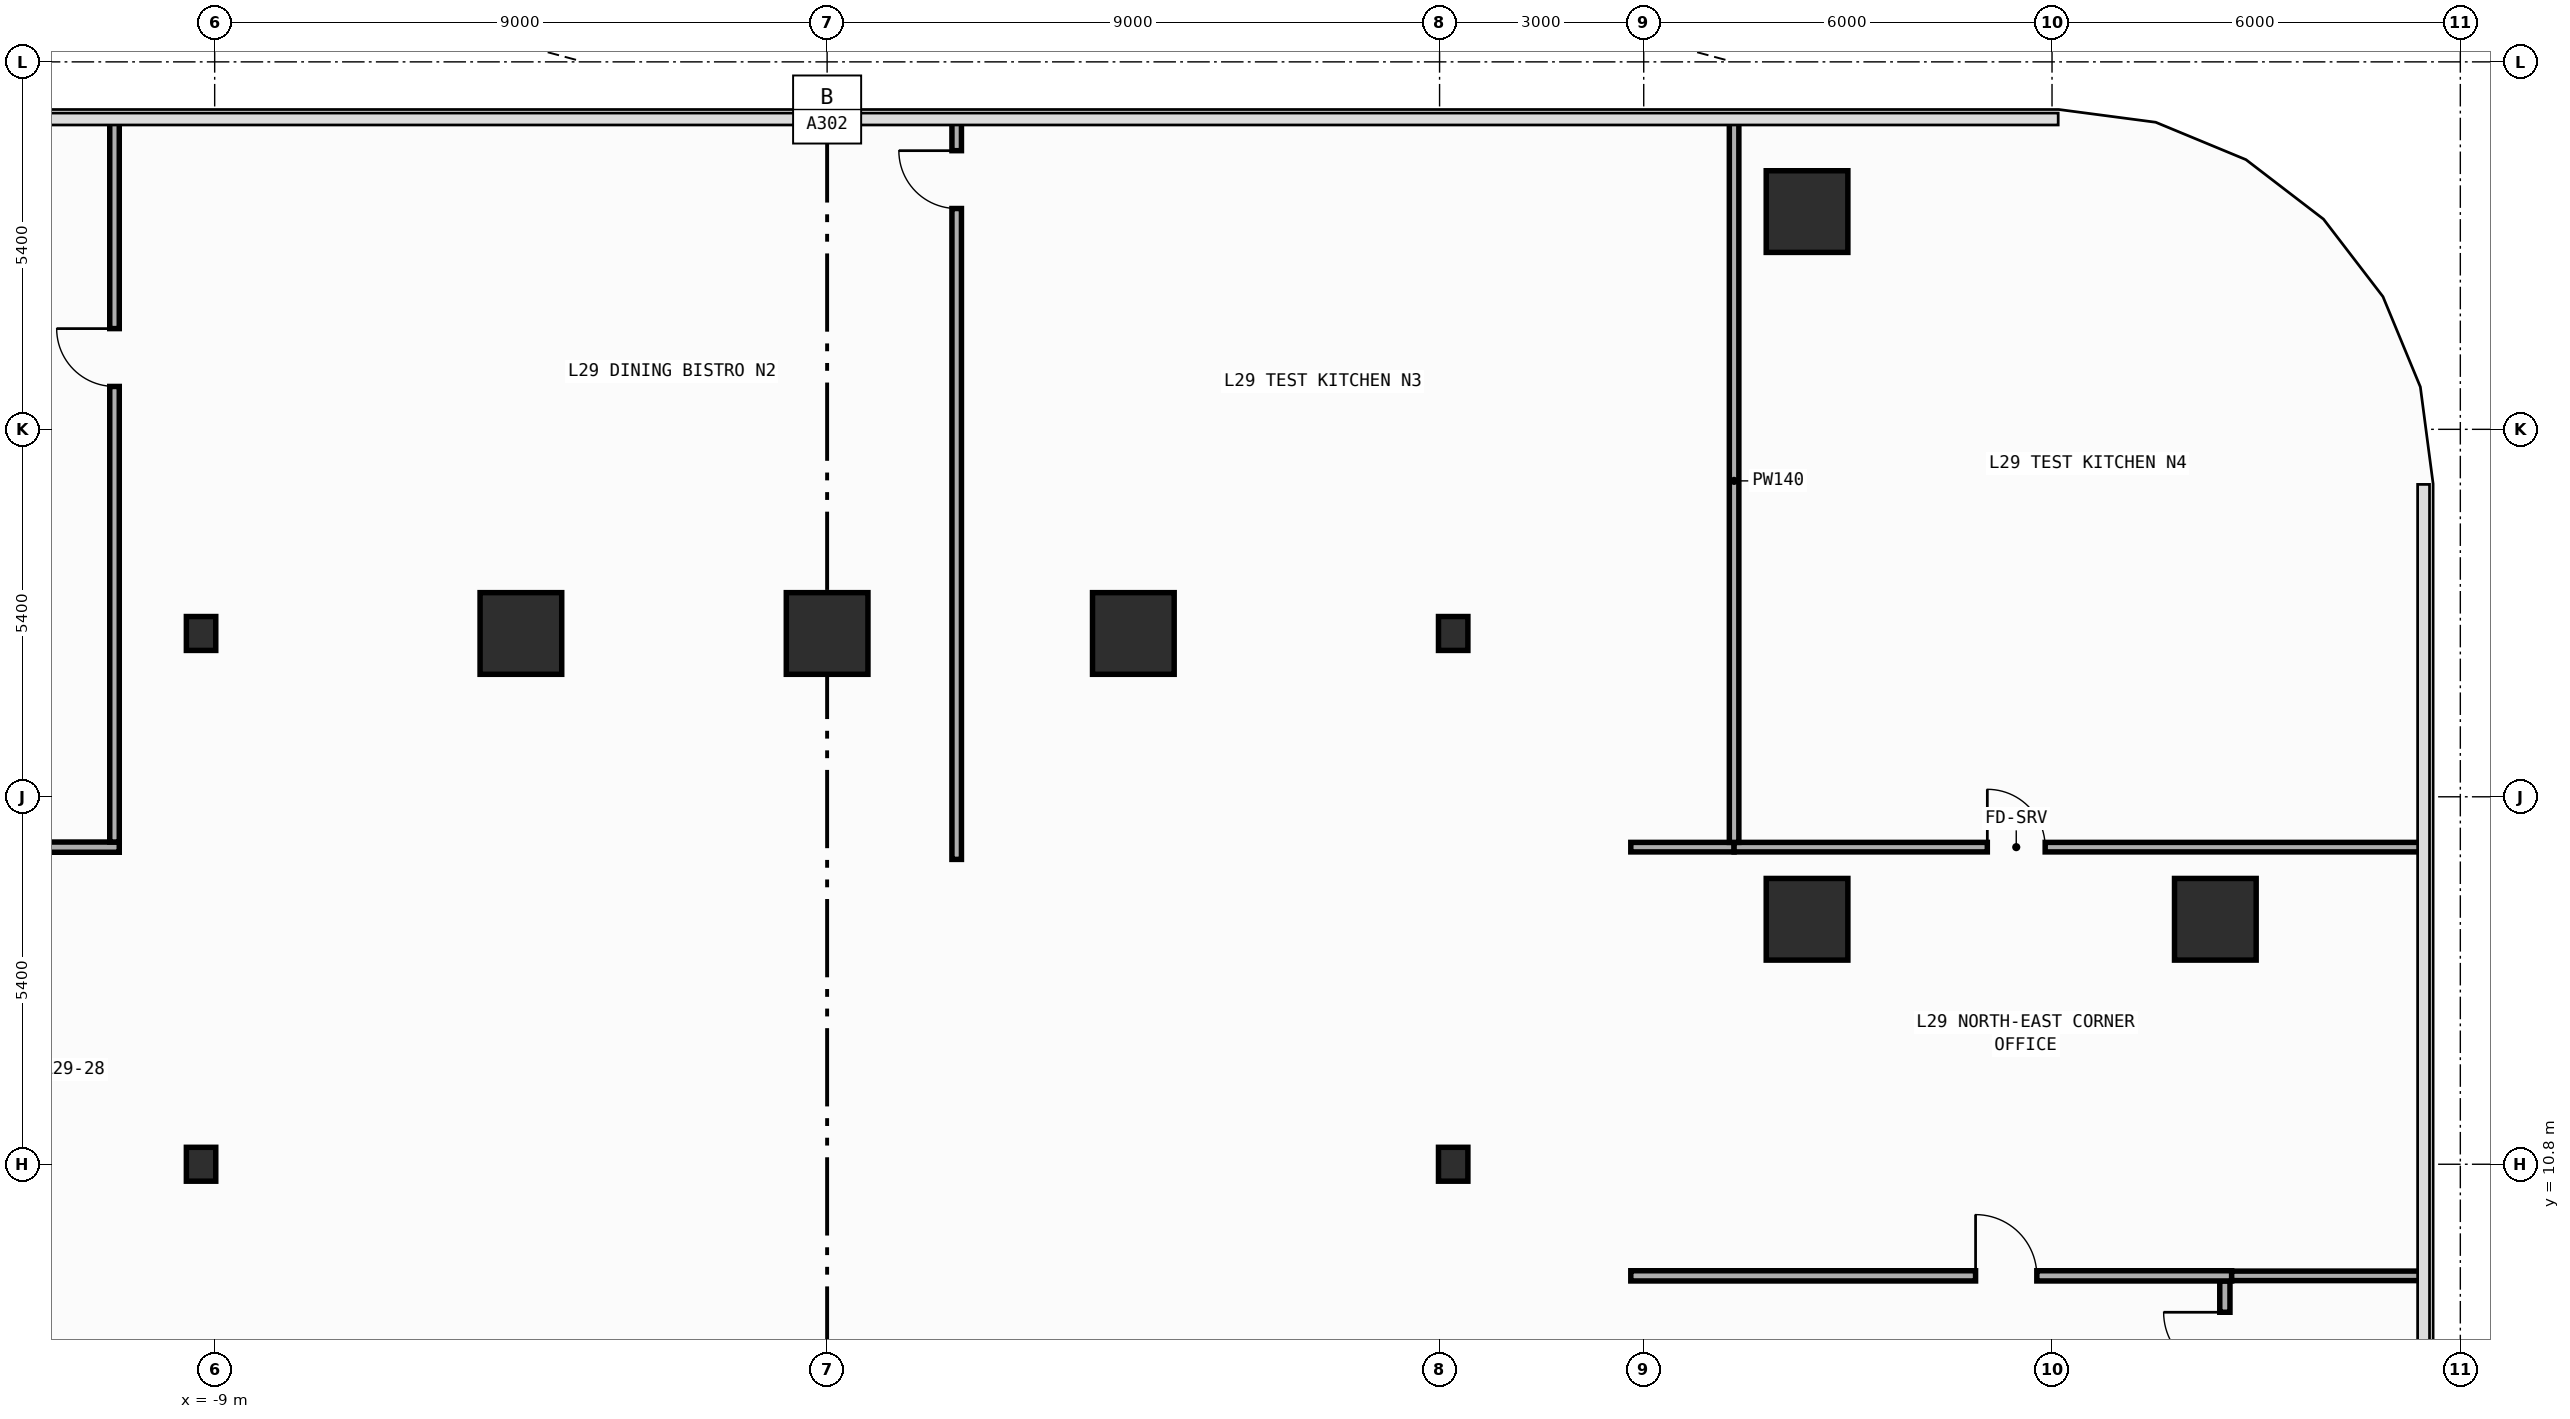
"""IFC4 building model, lengths in metres.
Left out: names, types, materials, properties, quantities, classifications, styles, units other than length and angle.
Written with IfcOpenShell. Run it as: python <this file> out.ifc"""

import sys

from ifc_helpers import new_model, si_unit, direction, frame, frame_2d, origin, origin_2d, place, context, subcontext, project, spatial, rectangle, i_section, extrude, element, fill, save


model = new_model("IFC4")
c1 = context("Model", 3, precision=1e-05, world=origin(), true_north=direction((0.0, 1.0)))
c2 = subcontext(c1, "Body", "Model", "MODEL_VIEW")
j1 = project(units=[si_unit("LENGTHUNIT", "METRE"), si_unit("PLANEANGLEUNIT", "RADIAN")], contexts=[c1])
p1 = place(None, origin())
s1 = spatial("IfcSite", under=j1, at=p1, CompositionType="ELEMENT")
p2 = place(p1, origin())
s2 = spatial("IfcBuilding", under=s1, at=p2, CompositionType="ELEMENT")
p3 = place(p2, frame((0.0, 0.0, 126.8)))
s3 = spatial("IfcBuildingStorey", under=s2, at=p3, CompositionType="ELEMENT", Elevation=126.8)
for number, where, z_axis, x_axis in (
    (1, (-9.2, 10.8, 0.0), (0.0, 0.0, 1.0), (1.0, 0.0, 0.0)),
    (2, (-9.2, 18.6, 0.0), (0.0, 0.0, 1.0), (1.0, 0.0, 0.0)),
    (3, (9.2, 10.8, 0.0), (0.0, 0.0, 1.0), (1.0, 0.0, 0.0)),
    (4, (9.2, 18.6, 0.0), (0.0, 0.0, 1.0), (1.0, 0.0, 0.0)),
):
    element("IfcColumn", number, at=place(p3, frame(where, z_axis=z_axis, x_axis=x_axis)), inside=s3, PredefinedType="COLUMN", context=c2, shape_type="SweptSolid", body=[
        extrude(i_section(OverallWidth=0.432, OverallDepth=0.498, WebThickness=0.045, FlangeThickness=0.07, FilletRadius=0.022, at=origin_2d()), origin(), (0.0, 0.0, 1.0), 4.2),
    ])
for number, where, z_axis, x_axis in (
    (5, (20.4, 14.4, 0.0), (0.0, 0.0, 1.0), (1.0, 0.0, 0.0)),
    (6, (14.4, 14.4, 0.0), (0.0, 0.0, 1.0), (1.0, 0.0, 0.0)),
    (7, (-4.5, 18.6, 0.0), (0.0, 0.0, 1.0), (1.0, 0.0, 0.0)),
    (8, (0.0, 18.6, 0.0), (0.0, 0.0, 1.0), (1.0, 0.0, 0.0)),
    (9, (4.5, 18.6, 0.0), (0.0, 0.0, 1.0), (1.0, 0.0, 0.0)),
    (10, (14.4, 24.8, 0.0), (0.0, 0.0, 1.0), (1.0, 0.0, 0.0)),
):
    element("IfcColumn", number, at=place(p3, frame(where, z_axis=z_axis, x_axis=x_axis)), inside=s3, PredefinedType="COLUMN", context=c2, shape_type="SweptSolid", body=[
        extrude(rectangle(XDim=1.2, YDim=1.2, at=origin_2d()), origin(), (0.0, 0.0, 1.0), 4.2),
    ])
p4 = place(p3, frame((-11.99, 15.46, 0.0), z_axis=(0.0, 0.0, 1.0), x_axis=(1.0, 0.0, 0.0)))
e11 = element("IfcWall", 11, at=p4, inside=s3, PredefinedType="PARTITIONING", context=c2, shape_type="SweptSolid", body=[
    extrude(rectangle(XDim=1.588, YDim=0.15, at=frame_2d((0.794, 0.0))), origin(), (0.0, 0.0, 1.0), 3.94),
])
p5 = place(p3, frame((20.54, 7.06, 0.0), z_axis=(0.0, 0.0, 1.0), x_axis=(0.0, 1.0, 0.0)))
e12 = element("IfcWall", 12, at=p5, inside=s3, PredefinedType="PARTITIONING", context=c2, shape_type="SweptSolid", body=[
    extrude(rectangle(XDim=2.025, YDim=0.15, at=frame_2d((1.012, 0.0))), origin(), (0.0, 0.0, 1.0), 3.94),
])
p6 = place(p5, frame((0.665, 0.0, 0.0)))
e13 = element("IfcOpeningElement", 13, at=p6, cuts=e12, PredefinedType="OPENING", context=c2, shape_type="SweptSolid", body=[
    extrude(rectangle(XDim=0.9, YDim=2.15, at=frame_2d((0.45, 1.075))), frame((0.0, 0.085, 0.0), z_axis=(0.0, -1.0, 0.0), x_axis=(1.0, 0.0, 0.0)), (0.0, 0.0, 1.0), 0.17),
])
p7 = place(p3, frame((11.81, 9.16, 0.0), z_axis=(0.0, 0.0, 1.0), x_axis=(1.0, 0.0, 0.0)))
e14 = element("IfcWall", 14, at=p7, inside=s3, PredefinedType="PARTITIONING", context=c2, shape_type="SweptSolid", body=[
    extrude(rectangle(XDim=8.83, YDim=0.15, at=frame_2d((4.415, 0.0))), origin(), (0.0, 0.0, 1.0), 3.94),
])
p8 = place(p7, frame((5.067, 0.0, 0.0)))
e15 = element("IfcOpeningElement", 15, at=p8, cuts=e14, PredefinedType="OPENING", context=c2, shape_type="SweptSolid", body=[
    extrude(rectangle(XDim=0.9, YDim=2.15, at=frame_2d((0.45, 1.075))), frame((0.0, 0.085, 0.0), z_axis=(0.0, -1.0, 0.0), x_axis=(1.0, 0.0, 0.0)), (0.0, 0.0, 1.0), 0.17),
])
p9 = place(p3, frame((20.64, 9.16, 0.0), z_axis=(0.0, 0.0, 1.0), x_axis=(1.0, 0.0, 0.0)))
e16 = element("IfcWall", 16, at=p9, inside=s3, PredefinedType="PARTITIONING", context=c2, shape_type="SweptSolid", body=[
    extrude(rectangle(XDim=2.815, YDim=0.14, at=frame_2d((1.408, 0.0))), origin(), (0.0, 0.0, 1.0), 3.94),
])
p10 = place(p3, frame((11.81, 15.46, 0.0), z_axis=(0.0, 0.0, 1.0), x_axis=(1.0, 0.0, 0.0)))
e17 = element("IfcWall", 17, at=p10, inside=s3, PredefinedType="PARTITIONING", context=c2, shape_type="SweptSolid", body=[
    extrude(rectangle(XDim=1.518, YDim=0.14, at=frame_2d((0.759, 0.0))), origin(), (0.0, 0.0, 1.0), 3.94),
])
p11 = place(p3, frame((13.328, 15.46, 0.0), z_axis=(0.0, 0.0, 1.0), x_axis=(1.0, 0.0, 0.0)))
e18 = element("IfcWall", 18, at=p11, inside=s3, PredefinedType="PARTITIONING", context=c2, shape_type="SweptSolid", body=[
    extrude(rectangle(XDim=10.127, YDim=0.14, at=frame_2d((5.063, 0.0))), origin(), (0.0, 0.0, 1.0), 3.94),
])
p12 = place(p11, frame((3.721, 0.0, 0.0)))
e19 = element("IfcOpeningElement", 19, at=p12, cuts=e18, PredefinedType="OPENING", context=c2, shape_type="SweptSolid", body=[
    extrude(rectangle(XDim=0.85, YDim=2.1, at=frame_2d((0.425, 1.05))), frame((0.0, 0.08, 0.0), z_axis=(0.0, -1.0, 0.0), x_axis=(1.0, 0.0, 0.0)), (0.0, 0.0, 1.0), 0.16),
])
p13 = place(p3, frame((-10.472, 15.535, 0.0), z_axis=(0.0, 0.0, 1.0), x_axis=(0.0, 1.0, 0.0)))
e20 = element("IfcWall", 20, at=p13, inside=s3, PredefinedType="PARTITIONING", context=c2, shape_type="SweptSolid", body=[
    extrude(rectangle(XDim=10.62, YDim=0.14, at=frame_2d((5.31, 0.0))), origin(), (0.0, 0.0, 1.0), 3.94),
])
p14 = place(p13, frame((6.695, 0.0, 0.0)))
e21 = element("IfcOpeningElement", 21, at=p14, cuts=e20, PredefinedType="OPENING", context=c2, shape_type="SweptSolid", body=[
    extrude(rectangle(XDim=0.85, YDim=2.1, at=frame_2d((0.425, 1.05))), frame((0.0, 0.08, 0.0), z_axis=(0.0, -1.0, 0.0), x_axis=(1.0, 0.0, 0.0)), (0.0, 0.0, 1.0), 0.16),
])
p15 = place(p3, frame((1.904, 15.28, 0.0), z_axis=(0.0, 0.0, 1.0), x_axis=(0.0, 1.0, 0.0)))
e22 = element("IfcWall", 22, at=p15, inside=s3, PredefinedType="PARTITIONING", context=c2, shape_type="SweptSolid", body=[
    extrude(rectangle(XDim=10.875, YDim=0.14, at=frame_2d((5.438, 0.0))), origin(), (0.0, 0.0, 1.0), 3.94),
])
p16 = place(p15, frame((9.565, 0.0, 0.0)))
e23 = element("IfcOpeningElement", 23, at=p16, cuts=e22, PredefinedType="OPENING", context=c2, shape_type="SweptSolid", body=[
    extrude(rectangle(XDim=0.85, YDim=2.1, at=frame_2d((0.425, 1.05))), frame((0.0, 0.08, 0.0), z_axis=(0.0, -1.0, 0.0), x_axis=(1.0, 0.0, 0.0)), (0.0, 0.0, 1.0), 0.16),
])
p17 = place(p3, frame((13.328, 15.53, 0.0), z_axis=(0.0, 0.0, 1.0), x_axis=(0.0, 1.0, 0.0)))
e24 = element("IfcWall", 24, at=p17, inside=s3, PredefinedType="PARTITIONING", context=c2, shape_type="SweptSolid", body=[
    extrude(rectangle(XDim=10.625, YDim=0.14, at=frame_2d((5.312, 0.0))), origin(), (0.0, 0.0, 1.0), 3.94),
])
p18 = place(p6, origin())
e25 = element("IfcDoor", 25, at=p18, inside=s3, OperationType="SINGLE_SWING_RIGHT", PredefinedType="DOOR", context=c2, shape_type="SweptSolid", body=[
    extrude(rectangle(XDim=0.9, YDim=2.15, at=frame_2d((0.45, 1.075))), frame((0.0, 0.025, 0.0), z_axis=(0.0, -1.0, 0.0), x_axis=(1.0, 0.0, 0.0)), (0.0, 0.0, 1.0), 0.05),
])
fill(e13, e25)
p19 = place(p8, origin())
e26 = element("IfcDoor", 26, at=p19, inside=s3, OperationType="SINGLE_SWING_LEFT", PredefinedType="DOOR", context=c2, shape_type="SweptSolid", body=[
    extrude(rectangle(XDim=0.9, YDim=2.15, at=frame_2d((0.45, 1.075))), frame((0.0, 0.025, 0.0), z_axis=(0.0, -1.0, 0.0), x_axis=(1.0, 0.0, 0.0)), (0.0, 0.0, 1.0), 0.05),
])
fill(e15, e26)
p20 = place(p14, origin())
e27 = element("IfcDoor", 27, at=p20, inside=s3, OperationType="SINGLE_SWING_RIGHT", PredefinedType="DOOR", context=c2, shape_type="SweptSolid", body=[
    extrude(rectangle(XDim=0.85, YDim=2.1, at=frame_2d((0.425, 1.05))), frame((0.0, 0.025, 0.0), z_axis=(0.0, -1.0, 0.0), x_axis=(1.0, 0.0, 0.0)), (0.0, 0.0, 1.0), 0.05),
])
fill(e21, e27)
p21 = place(p12, origin())
e28 = element("IfcDoor", 28, at=p21, inside=s3, OperationType="SINGLE_SWING_LEFT", PredefinedType="DOOR", context=c2, shape_type="SweptSolid", body=[
    extrude(rectangle(XDim=0.85, YDim=2.1, at=frame_2d((0.425, 1.05))), frame((0.0, 0.025, 0.0), z_axis=(0.0, -1.0, 0.0), x_axis=(1.0, 0.0, 0.0)), (0.0, 0.0, 1.0), 0.05),
])
fill(e19, e28)
p22 = place(p16, origin())
e29 = element("IfcDoor", 29, at=p22, inside=s3, OperationType="SINGLE_SWING_RIGHT", PredefinedType="DOOR", context=c2, shape_type="SweptSolid", body=[
    extrude(rectangle(XDim=0.85, YDim=2.1, at=frame_2d((0.425, 1.05))), frame((0.0, 0.025, 0.0), z_axis=(0.0, -1.0, 0.0), x_axis=(1.0, 0.0, 0.0)), (0.0, 0.0, 1.0), 0.05),
])
fill(e23, e29)
save(model, sys.argv[1])
